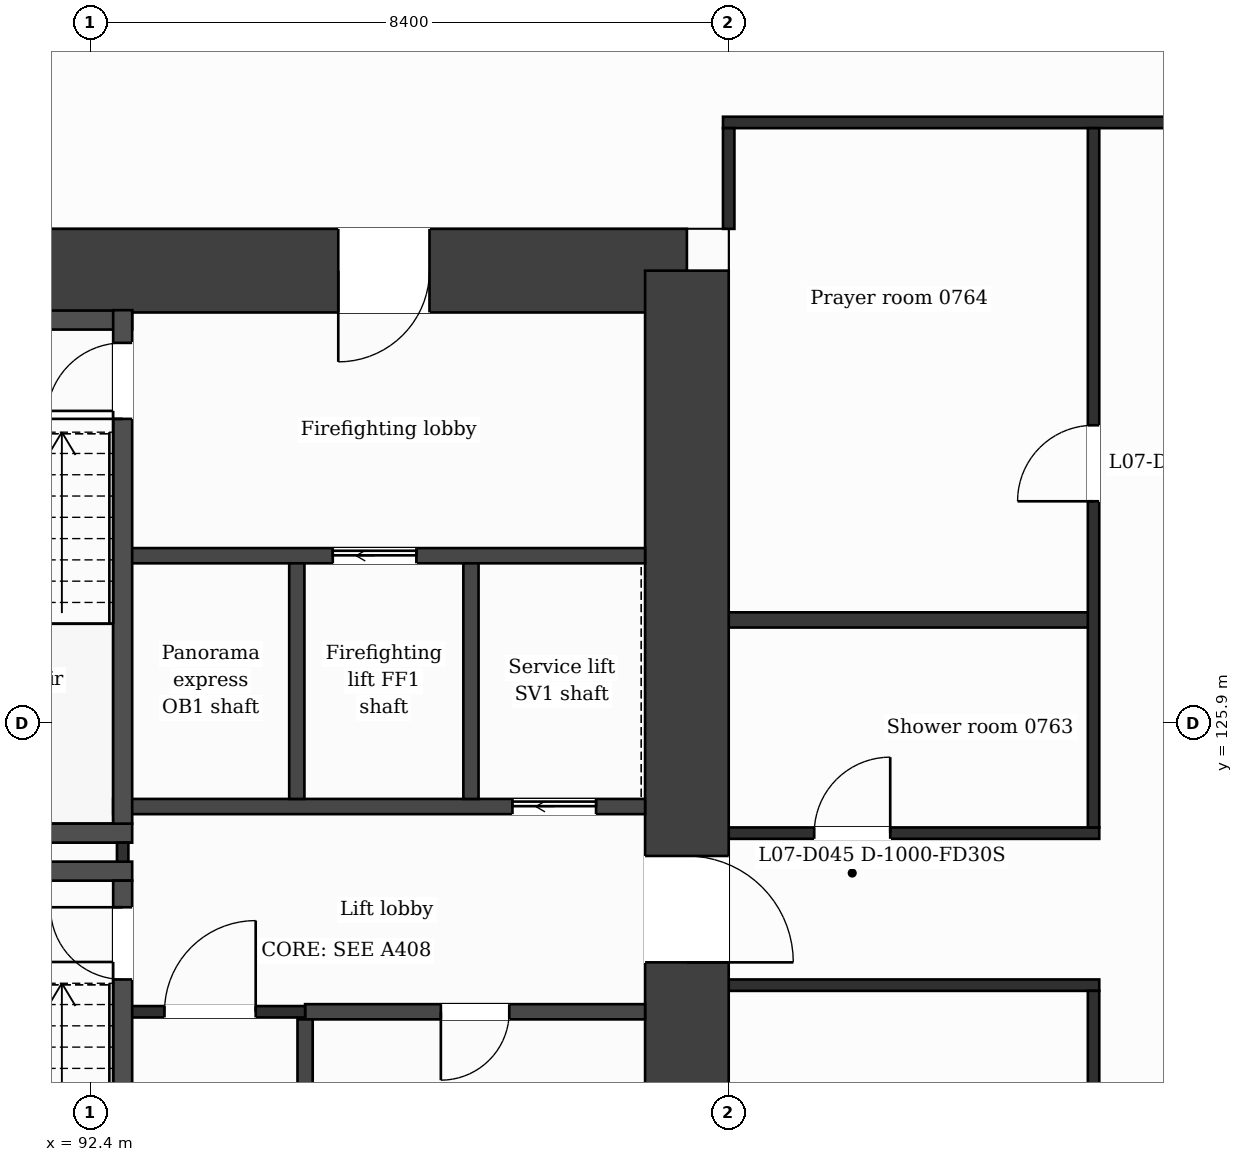
"""IFC4 building model, lengths in metres.
Left out: names, types, materials, properties, quantities, classifications, styles, units other than length and angle.
Written with IfcOpenShell. Run it as: python <this file> out.ifc"""

import sys

from ifc_helpers import new_model, si_unit, direction, frame, frame_2d, origin, place, context, subcontext, project, spatial, rectangle, extrude, element, fill, save


model = new_model("IFC4")
c1 = context("Model", 3, precision=1e-05, world=origin(), true_north=direction((0.0, 1.0)))
c2 = subcontext(c1, "Body", "Model", "MODEL_VIEW")
j1 = project(units=[si_unit("LENGTHUNIT", "METRE"), si_unit("PLANEANGLEUNIT", "RADIAN")], contexts=[c1])
p1 = place(None, origin())
s1 = spatial("IfcSite", under=j1, at=p1, CompositionType="ELEMENT")
p2 = place(p1, origin())
s2 = spatial("IfcBuilding", under=s1, at=p2, CompositionType="ELEMENT")
p3 = place(p2, frame((0.0, 0.0, 42.5)))
s3 = spatial("IfcBuildingStorey", under=s2, at=p3, CompositionType="ELEMENT", Elevation=42.5)
p4 = place(p3, frame((89.112, 131.85, 0.0), z_axis=(0.0, 0.0, 1.0), x_axis=(1.0, 0.0, 0.0)))
e1 = element("IfcWall", 1, at=p4, inside=s3, PredefinedType="SHEAR", context=c2, shape_type="SweptSolid", body=[
    extrude(rectangle(XDim=11.138, YDim=1.1, at=frame_2d((5.569, 0.0))), origin(), (0.0, 0.0, 1.0), 3.5),
])
p5 = place(p4, frame((6.552, 0.0, 0.0)))
e2 = element("IfcOpeningElement", 2, at=p5, cuts=e1, PredefinedType="OPENING", context=c2, shape_type="SweptSolid", body=[
    extrude(rectangle(XDim=1.2, YDim=2.1, at=frame_2d((0.6, 1.05))), frame((0.0, 0.56, 0.0), z_axis=(0.0, -1.0, 0.0), x_axis=(1.0, 0.0, 0.0)), (0.0, 0.0, 1.0), 1.12),
])
p6 = place(p3, frame((100.25, 131.85, 0.0), z_axis=(0.0, 0.0, 1.0), x_axis=(0.0, -1.0, 0.0)))
e3 = element("IfcWall", 3, at=p6, inside=s3, PredefinedType="SHEAR", context=c2, shape_type="SweptSolid", body=[
    extrude(rectangle(XDim=20.9, YDim=1.1, at=frame_2d((10.45, 0.0))), origin(), (0.0, 0.0, 1.0), 3.5),
])
p7 = place(p6, frame((7.7, 0.0, 0.0)))
e4 = element("IfcOpeningElement", 4, at=p7, cuts=e3, PredefinedType="OPENING", context=c2, shape_type="SweptSolid", body=[
    extrude(rectangle(XDim=1.4, YDim=2.1, at=frame_2d((0.7, 1.05))), frame((0.0, 0.56, 0.0), z_axis=(0.0, -1.0, 0.0), x_axis=(1.0, 0.0, 0.0)), (0.0, 0.0, 1.0), 1.12),
])
p8 = place(p3, frame((95.227, 122.1, 0.0), z_axis=(0.0, 0.0, 1.0), x_axis=(1.0, 0.0, 0.0)))
e5 = element("IfcWall", 5, at=p8, inside=s3, PredefinedType="PARTITIONING", context=c2, shape_type="SweptSolid", body=[
    extrude(rectangle(XDim=4.473, YDim=0.2, at=frame_2d((2.236, 0.0))), origin(), (0.0, 0.0, 1.0), 3.18),
])
p9 = place(p8, frame((1.786, 0.0, 0.0)))
e6 = element("IfcOpeningElement", 6, at=p9, cuts=e5, PredefinedType="OPENING", context=c2, shape_type="SweptSolid", body=[
    extrude(rectangle(XDim=0.9, YDim=2.1, at=frame_2d((0.45, 1.05))), frame((0.0, 0.11, 0.0), z_axis=(0.0, -1.0, 0.0), x_axis=(1.0, 0.0, 0.0)), (0.0, 0.0, 1.0), 0.22),
])
p10 = place(p3, frame((92.827, 122.1, 0.0), z_axis=(0.0, 0.0, 1.0), x_axis=(1.0, 0.0, 0.0)))
e7 = element("IfcWall", 7, at=p10, inside=s3, PredefinedType="PARTITIONING", context=c2, shape_type="SweptSolid", body=[
    extrude(rectangle(XDim=2.4, YDim=0.15, at=frame_2d((1.2, 0.0))), origin(), (0.0, 0.0, 1.0), 3.18),
])
p11 = place(p10, frame((0.55, 0.0, 0.0)))
e8 = element("IfcOpeningElement", 8, at=p11, cuts=e7, PredefinedType="OPENING", context=c2, shape_type="SweptSolid", body=[
    extrude(rectangle(XDim=1.2, YDim=2.1, at=frame_2d((0.6, 1.05))), frame((0.0, 0.085, 0.0), z_axis=(0.0, -1.0, 0.0), x_axis=(1.0, 0.0, 0.0)), (0.0, 0.0, 1.0), 0.17),
])
p12 = place(p3, frame((100.8, 122.45, 0.0), z_axis=(0.0, 0.0, 1.0), x_axis=(1.0, 0.0, 0.0)))
e9 = element("IfcWall", 9, at=p12, inside=s3, PredefinedType="PARTITIONING", context=c2, shape_type="SweptSolid", body=[
    extrude(rectangle(XDim=4.875, YDim=0.15, at=frame_2d((2.438, 0.0))), origin(), (0.0, 0.0, 1.0), 3.18),
])
for number, where, z_axis, x_axis in (
    (10, (89.552, 123.95, 0.0), (0.0, 0.0, 1.0), (1.0, 0.0, 0.0)),
    (11, (89.552, 124.45, 0.0), (0.0, 0.0, 1.0), (1.0, 0.0, 0.0)),
):
    element("IfcWall", number, at=place(p3, frame(where, z_axis=z_axis, x_axis=x_axis)), inside=s3, PredefinedType="PARTITIONING", context=c2, shape_type="SweptSolid", body=[
        extrude(rectangle(XDim=3.4, YDim=0.25, at=frame_2d((1.7, 0.0))), origin(), (0.0, 0.0, 1.0), 3.18),
    ])
p13 = place(p3, frame((100.8, 124.45, 0.0), z_axis=(0.0, 0.0, 1.0), x_axis=(1.0, 0.0, 0.0)))
e12 = element("IfcWall", 12, at=p13, inside=s3, PredefinedType="PARTITIONING", context=c2, shape_type="SweptSolid", body=[
    extrude(rectangle(XDim=4.875, YDim=0.15, at=frame_2d((2.438, 0.0))), origin(), (0.0, 0.0, 1.0), 3.18),
])
p14 = place(p13, frame((1.125, 0.0, 0.0)))
e13 = element("IfcOpeningElement", 13, at=p14, cuts=e12, PredefinedType="OPENING", context=c2, shape_type="SweptSolid", body=[
    extrude(rectangle(XDim=1.0, YDim=2.1, at=frame_2d((0.5, 1.05))), frame((0.0, 0.085, 0.0), z_axis=(0.0, -1.0, 0.0), x_axis=(1.0, 0.0, 0.0)), (0.0, 0.0, 1.0), 0.17),
])
p15 = place(p3, frame((92.702, 124.8, 0.0), z_axis=(0.0, 0.0, 1.0), x_axis=(1.0, 0.0, 0.0)))
e14 = element("IfcWall", 14, at=p15, inside=s3, PredefinedType="PARTITIONING", context=c2, shape_type="SweptSolid", body=[
    extrude(rectangle(XDim=6.998, YDim=0.2, at=frame_2d((3.499, 0.0))), origin(), (0.0, 0.0, 1.0), 3.18),
])
p16 = place(p15, frame((5.253, 0.0, 0.0)))
e15 = element("IfcOpeningElement", 15, at=p16, cuts=e14, PredefinedType="OPENING", context=c2, shape_type="SweptSolid", body=[
    extrude(rectangle(XDim=1.1, YDim=2.1, at=frame_2d((0.55, 1.05))), frame((0.0, 0.11, 0.0), z_axis=(0.0, -1.0, 0.0), x_axis=(1.0, 0.0, 0.0)), (0.0, 0.0, 1.0), 0.22),
])
p17 = place(p3, frame((100.8, 127.255, 0.0), z_axis=(0.0, 0.0, 1.0), x_axis=(1.0, 0.0, 0.0)))
e16 = element("IfcWall", 16, at=p17, inside=s3, PredefinedType="PARTITIONING", context=c2, shape_type="SweptSolid", body=[
    extrude(rectangle(XDim=4.8, YDim=0.2, at=frame_2d((2.4, 0.0))), origin(), (0.0, 0.0, 1.0), 3.18),
])
p18 = place(p3, frame((92.827, 128.1, 0.0), z_axis=(0.0, 0.0, 1.0), x_axis=(1.0, 0.0, 0.0)))
e17 = element("IfcWall", 17, at=p18, inside=s3, PredefinedType="PARTITIONING", context=c2, shape_type="SweptSolid", body=[
    extrude(rectangle(XDim=6.873, YDim=0.2, at=frame_2d((3.437, 0.0))), origin(), (0.0, 0.0, 1.0), 3.18),
])
p19 = place(p18, frame((2.764, 0.0, 0.0)))
e18 = element("IfcOpeningElement", 18, at=p19, cuts=e17, PredefinedType="OPENING", context=c2, shape_type="SweptSolid", body=[
    extrude(rectangle(XDim=1.1, YDim=2.1, at=frame_2d((0.55, 1.05))), frame((0.0, 0.11, 0.0), z_axis=(0.0, -1.0, 0.0), x_axis=(1.0, 0.0, 0.0)), (0.0, 0.0, 1.0), 0.22),
])
p20 = place(p3, frame((89.552, 131.2, 0.0), z_axis=(0.0, 0.0, 1.0), x_axis=(1.0, 0.0, 0.0)))
e19 = element("IfcWall", 19, at=p20, inside=s3, PredefinedType="PARTITIONING", context=c2, shape_type="SweptSolid", body=[
    extrude(rectangle(XDim=3.4, YDim=0.25, at=frame_2d((1.7, 0.0))), origin(), (0.0, 0.0, 1.0), 3.18),
])
p21 = place(p3, frame((100.725, 133.8, 0.0), z_axis=(0.0, 0.0, 1.0), x_axis=(1.0, 0.0, 0.0)))
e20 = element("IfcWall", 20, at=p21, inside=s3, PredefinedType="PARTITIONING", context=c2, shape_type="SweptSolid", body=[
    extrude(rectangle(XDim=25.35, YDim=0.15, at=frame_2d((12.675, 0.0))), origin(), (0.0, 0.0, 1.0), 3.18),
])
p22 = place(p3, frame((92.827, 124.075, 0.0), z_axis=(0.0, 0.0, 1.0), x_axis=(0.0, 1.0, 0.0)))
e21 = element("IfcWall", 21, at=p22, inside=s3, PredefinedType="PARTITIONING", context=c2, shape_type="SweptSolid", body=[
    extrude(rectangle(XDim=0.25, YDim=0.15, at=frame_2d((0.125, 0.0))), origin(), (0.0, 0.0, 1.0), 3.18),
])
p23 = place(p3, frame((92.827, 117.07, 0.0), z_axis=(0.0, 0.0, 1.0), x_axis=(0.0, 1.0, 0.0)))
e22 = element("IfcWall", 22, at=p23, inside=s3, PredefinedType="PARTITIONING", context=c2, shape_type="SweptSolid", body=[
    extrude(rectangle(XDim=6.755, YDim=0.25, at=frame_2d((3.377, 0.0))), origin(), (0.0, 0.0, 1.0), 3.18),
])
p24 = place(p23, frame((5.455, 0.0, 0.0)))
e23 = element("IfcOpeningElement", 23, at=p24, cuts=e22, PredefinedType="OPENING", context=c2, shape_type="SweptSolid", body=[
    extrude(rectangle(XDim=0.95, YDim=2.1, at=frame_2d((0.475, 1.05))), frame((0.0, 0.135, 0.0), z_axis=(0.0, -1.0, 0.0), x_axis=(1.0, 0.0, 0.0)), (0.0, 0.0, 1.0), 0.27),
])
p25 = place(p3, frame((92.827, 124.575, 0.0), z_axis=(0.0, 0.0, 1.0), x_axis=(0.0, 1.0, 0.0)))
e24 = element("IfcWall", 24, at=p25, inside=s3, PredefinedType="PARTITIONING", context=c2, shape_type="SweptSolid", body=[
    extrude(rectangle(XDim=6.755, YDim=0.25, at=frame_2d((3.377, 0.0))), origin(), (0.0, 0.0, 1.0), 3.18),
])
p26 = place(p25, frame((5.325, 0.0, 0.0)))
e25 = element("IfcOpeningElement", 25, at=p26, cuts=e24, PredefinedType="OPENING", context=c2, shape_type="SweptSolid", body=[
    extrude(rectangle(XDim=1.0, YDim=2.1, at=frame_2d((0.5, 1.05))), frame((0.0, 0.135, 0.0), z_axis=(0.0, -1.0, 0.0), x_axis=(1.0, 0.0, 0.0)), (0.0, 0.0, 1.0), 0.27),
])
p27 = place(p3, frame((95.118, 124.9, 0.0), z_axis=(0.0, 0.0, 1.0), x_axis=(0.0, 1.0, 0.0)))
e26 = element("IfcWall", 26, at=p27, inside=s3, PredefinedType="PARTITIONING", context=c2, shape_type="SweptSolid", body=[
    extrude(rectangle(XDim=3.1, YDim=0.2, at=frame_2d((1.55, 0.0))), origin(), (0.0, 0.0, 1.0), 3.18),
])
p28 = place(p3, frame((95.227, 117.07, 0.0), z_axis=(0.0, 0.0, 1.0), x_axis=(0.0, 1.0, 0.0)))
e27 = element("IfcWall", 27, at=p28, inside=s3, PredefinedType="PARTITIONING", context=c2, shape_type="SweptSolid", body=[
    extrude(rectangle(XDim=4.93, YDim=0.2, at=frame_2d((2.465, 0.0))), origin(), (0.0, 0.0, 1.0), 3.18),
])
p29 = place(p28, frame((0.48, 0.0, 0.0)))
e28 = element("IfcOpeningElement", 28, at=p29, cuts=e27, PredefinedType="OPENING", context=c2, shape_type="SweptSolid", body=[
    extrude(rectangle(XDim=0.9, YDim=2.1, at=frame_2d((0.45, 1.05))), frame((0.0, 0.11, 0.0), z_axis=(0.0, -1.0, 0.0), x_axis=(1.0, 0.0, 0.0)), (0.0, 0.0, 1.0), 0.22),
])
p30 = place(p3, frame((97.409, 124.9, 0.0), z_axis=(0.0, 0.0, 1.0), x_axis=(0.0, 1.0, 0.0)))
e29 = element("IfcWall", 29, at=p30, inside=s3, PredefinedType="PARTITIONING", context=c2, shape_type="SweptSolid", body=[
    extrude(rectangle(XDim=3.1, YDim=0.2, at=frame_2d((1.55, 0.0))), origin(), (0.0, 0.0, 1.0), 3.18),
])
p31 = place(p3, frame((100.8, 132.4, 0.0), z_axis=(0.0, 0.0, 1.0), x_axis=(0.0, 1.0, 0.0)))
e30 = element("IfcWall", 30, at=p31, inside=s3, PredefinedType="PARTITIONING", context=c2, shape_type="SweptSolid", body=[
    extrude(rectangle(XDim=1.325, YDim=0.15, at=frame_2d((0.663, 0.0))), origin(), (0.0, 0.0, 1.0), 3.18),
])
p32 = place(p3, frame((105.6, 109.075, 0.0), z_axis=(0.0, 0.0, 1.0), x_axis=(0.0, 1.0, 0.0)))
e31 = element("IfcWall", 31, at=p32, inside=s3, PredefinedType="PARTITIONING", context=c2, shape_type="SweptSolid", body=[
    extrude(rectangle(XDim=13.3, YDim=0.15, at=frame_2d((6.65, 0.0))), origin(), (0.0, 0.0, 1.0), 3.18),
])
p33 = place(p32, frame((7.396, 0.0, 0.0)))
e32 = element("IfcOpeningElement", 32, at=p33, cuts=e31, PredefinedType="OPENING", context=c2, shape_type="SweptSolid", body=[
    extrude(rectangle(XDim=1.0, YDim=2.1, at=frame_2d((0.5, 1.05))), frame((0.0, 0.085, 0.0), z_axis=(0.0, -1.0, 0.0), x_axis=(1.0, 0.0, 0.0)), (0.0, 0.0, 1.0), 0.17),
])
p34 = place(p3, frame((105.6, 124.525, 0.0), z_axis=(0.0, 0.0, 1.0), x_axis=(0.0, 1.0, 0.0)))
e33 = element("IfcWall", 33, at=p34, inside=s3, PredefinedType="PARTITIONING", context=c2, shape_type="SweptSolid", body=[
    extrude(rectangle(XDim=9.2, YDim=0.15, at=frame_2d((4.6, 0.0))), origin(), (0.0, 0.0, 1.0), 3.18),
])
p35 = place(p34, frame((4.291, 0.0, 0.0)))
e34 = element("IfcOpeningElement", 34, at=p35, cuts=e33, PredefinedType="OPENING", context=c2, shape_type="SweptSolid", body=[
    extrude(rectangle(XDim=1.0, YDim=2.1, at=frame_2d((0.5, 1.05))), frame((0.0, 0.085, 0.0), z_axis=(0.0, -1.0, 0.0), x_axis=(1.0, 0.0, 0.0)), (0.0, 0.0, 1.0), 0.17),
])
p36 = place(p11, origin())
e35 = element("IfcDoor", 35, at=p36, inside=s3, OperationType="SINGLE_SWING_RIGHT", PredefinedType="DOOR", context=c2, shape_type="SweptSolid", body=[
    extrude(rectangle(XDim=1.2, YDim=2.1, at=frame_2d((0.6, 1.05))), frame((0.0, 0.025, 0.0), z_axis=(0.0, -1.0, 0.0), x_axis=(1.0, 0.0, 0.0)), (0.0, 0.0, 1.0), 0.05),
])
fill(e8, e35)
p37 = place(p19, origin())
e36 = element("IfcDoor", 36, at=p37, inside=s3, OperationType="SLIDING_TO_LEFT", PredefinedType="DOOR", context=c2, shape_type="SweptSolid", body=[
    extrude(rectangle(XDim=1.1, YDim=2.1, at=frame_2d((0.55, 1.05))), frame((0.0, 0.025, 0.0), z_axis=(0.0, -1.0, 0.0), x_axis=(1.0, 0.0, 0.0)), (0.0, 0.0, 1.0), 0.05),
])
fill(e18, e36)
p38 = place(p16, origin())
e37 = element("IfcDoor", 37, at=p38, inside=s3, OperationType="SLIDING_TO_LEFT", PredefinedType="DOOR", context=c2, shape_type="SweptSolid", body=[
    extrude(rectangle(XDim=1.1, YDim=2.1, at=frame_2d((0.55, 1.05))), frame((0.0, 0.025, 0.0), z_axis=(0.0, -1.0, 0.0), x_axis=(1.0, 0.0, 0.0)), (0.0, 0.0, 1.0), 0.05),
])
fill(e15, e37)
p39 = place(p9, origin())
e38 = element("IfcDoor", 38, at=p39, inside=s3, OperationType="SINGLE_SWING_LEFT", PredefinedType="DOOR", context=c2, shape_type="SweptSolid", body=[
    extrude(rectangle(XDim=0.9, YDim=2.1, at=frame_2d((0.45, 1.05))), frame((0.0, 0.025, 0.0), z_axis=(0.0, -1.0, 0.0), x_axis=(1.0, 0.0, 0.0)), (0.0, 0.0, 1.0), 0.05),
])
fill(e6, e38)
p40 = place(p24, origin())
e39 = element("IfcDoor", 39, at=p40, inside=s3, OperationType="SINGLE_SWING_RIGHT", PredefinedType="DOOR", context=c2, shape_type="SweptSolid", body=[
    extrude(rectangle(XDim=0.95, YDim=2.1, at=frame_2d((0.475, 1.05))), frame((0.0, 0.025, 0.0), z_axis=(0.0, -1.0, 0.0), x_axis=(1.0, 0.0, 0.0)), (0.0, 0.0, 1.0), 0.05),
])
fill(e23, e39)
p41 = place(p26, origin())
e40 = element("IfcDoor", 40, at=p41, inside=s3, OperationType="SINGLE_SWING_LEFT", PredefinedType="DOOR", context=c2, shape_type="SweptSolid", body=[
    extrude(rectangle(XDim=1.0, YDim=2.1, at=frame_2d((0.5, 1.05))), frame((0.0, 0.025, 0.0), z_axis=(0.0, -1.0, 0.0), x_axis=(1.0, 0.0, 0.0)), (0.0, 0.0, 1.0), 0.05),
])
fill(e25, e40)
p42 = place(p14, origin())
e41 = element("IfcDoor", 41, at=p42, inside=s3, OperationType="SINGLE_SWING_RIGHT", PredefinedType="DOOR", context=c2, shape_type="SweptSolid", body=[
    extrude(rectangle(XDim=1.0, YDim=2.1, at=frame_2d((0.5, 1.05))), frame((0.0, 0.025, 0.0), z_axis=(0.0, -1.0, 0.0), x_axis=(1.0, 0.0, 0.0)), (0.0, 0.0, 1.0), 0.05),
])
fill(e13, e41)
p43 = place(p35, origin())
e42 = element("IfcDoor", 42, at=p43, inside=s3, OperationType="SINGLE_SWING_LEFT", PredefinedType="DOOR", context=c2, shape_type="SweptSolid", body=[
    extrude(rectangle(XDim=1.0, YDim=2.1, at=frame_2d((0.5, 1.05))), frame((0.0, 0.025, 0.0), z_axis=(0.0, -1.0, 0.0), x_axis=(1.0, 0.0, 0.0)), (0.0, 0.0, 1.0), 0.05),
])
fill(e34, e42)
p44 = place(p5, origin())
e43 = element("IfcDoor", 43, at=p44, inside=s3, OperationType="SINGLE_SWING_LEFT", PredefinedType="DOOR", context=c2, shape_type="SweptSolid", body=[
    extrude(rectangle(XDim=1.2, YDim=2.1, at=frame_2d((0.6, 1.05))), frame((0.0, 0.025, 0.0), z_axis=(0.0, -1.0, 0.0), x_axis=(1.0, 0.0, 0.0)), (0.0, 0.0, 1.0), 0.05),
])
fill(e2, e43)
p45 = place(p7, origin())
e44 = element("IfcDoor", 44, at=p45, inside=s3, OperationType="SINGLE_SWING_RIGHT", PredefinedType="DOOR", context=c2, shape_type="SweptSolid", body=[
    extrude(rectangle(XDim=1.4, YDim=2.1, at=frame_2d((0.7, 1.05))), frame((0.0, 0.025, 0.0), z_axis=(0.0, -1.0, 0.0), x_axis=(1.0, 0.0, 0.0)), (0.0, 0.0, 1.0), 0.05),
])
fill(e4, e44)
save(model, sys.argv[1])
